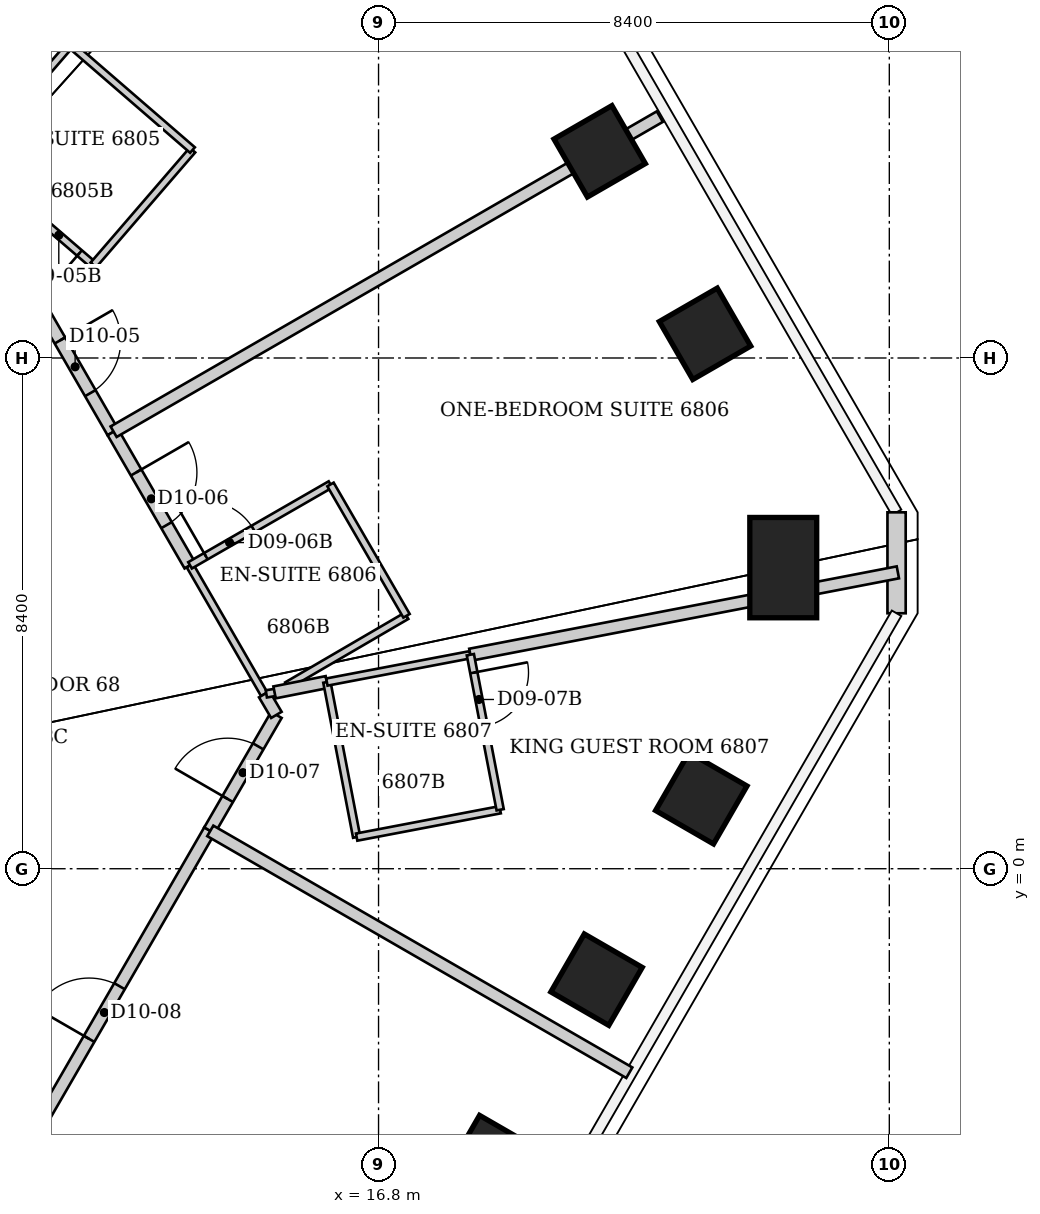
"""IFC4 building model, lengths in metres.
Left out: names, types, materials, properties, quantities, classifications, styles, units other than length and angle.
Written with IfcOpenShell. Run it as: python <this file> out.ifc"""

import sys

from ifc_helpers import new_model, si_unit, direction, frame, frame_2d, origin, origin_2d, place, context, subcontext, project, spatial, rectangle, extrude, element, fill, save


model = new_model("IFC4")
c1 = context("Model", 3, precision=1e-05, world=origin(), true_north=direction((0.0, 1.0)))
c2 = subcontext(c1, "Body", "Model", "MODEL_VIEW")
j1 = project(units=[si_unit("LENGTHUNIT", "METRE"), si_unit("PLANEANGLEUNIT", "RADIAN")], contexts=[c1])
p1 = place(None, origin())
s1 = spatial("IfcSite", under=j1, at=p1, CompositionType="ELEMENT")
p2 = place(p1, origin())
s2 = spatial("IfcBuilding", under=s1, at=p2, CompositionType="ELEMENT")
p3 = place(p2, frame((0.0, 0.0, 272.2)))
s3 = spatial("IfcBuildingStorey", under=s2, at=p3, CompositionType="ELEMENT", Elevation=272.2)
for number, where, z_axis, x_axis in (
    (1, (20.437, 11.799, 0.0), (0.0, 0.0, 1.0), (0.866, 0.5, 0.0)),
    (2, (22.169, 8.798, 0.0), (0.0, 0.0, 1.0), (0.866, 0.5, 0.0)),
):
    element("IfcColumn", number, at=place(p3, frame(where, z_axis=z_axis, x_axis=x_axis)), inside=s3, PredefinedType="COLUMN", context=c2, shape_type="SweptSolid", body=[
        extrude(rectangle(XDim=1.1, YDim=1.1, at=origin_2d()), origin(), (0.0, 0.0, 1.0), 3.8),
    ])
p4 = place(p3, frame((23.456, 4.952, 0.0), z_axis=(0.0, 0.0, 1.0), x_axis=(1.0, 0.0, 0.0)))
e3 = element("IfcColumn", 3, at=p4, inside=s3, PredefinedType="COLUMN", context=c2, shape_type="SweptSolid", body=[
    extrude(rectangle(XDim=1.1, YDim=1.65, at=origin_2d()), origin(), (0.0, 0.0, 1.0), 3.8),
])
for number, where, z_axis, x_axis in (
    (4, (22.108, 1.159, 0.0), (0.0, 0.0, 1.0), (0.866, -0.5, 0.0)),
    (5, (20.385, -1.824, 0.0), (0.0, 0.0, 1.0), (0.866, -0.5, 0.0)),
    (6, (18.663, -4.808, 0.0), (0.0, 0.0, 1.0), (0.866, -0.5, 0.0)),
):
    element("IfcColumn", number, at=place(p3, frame(where, z_axis=z_axis, x_axis=x_axis)), inside=s3, PredefinedType="COLUMN", context=c2, shape_type="SweptSolid", body=[
        extrude(rectangle(XDim=1.1, YDim=1.1, at=origin_2d()), origin(), (0.0, 0.0, 1.0), 3.8),
    ])
p5 = place(p3, frame((25.319, 5.862, 0.0), z_axis=(0.0, 0.0, 1.0), x_axis=(0.0, -1.0, 0.0)))
e7 = element("IfcWall", 7, at=p5, inside=s3, PredefinedType="SOLIDWALL", context=c2, shape_type="SweptSolid", body=[
    extrude(rectangle(XDim=1.66, YDim=0.3, at=frame_2d((0.83, 0.0))), origin(), (0.0, 0.0, 1.0), 3.64),
])
p6 = place(p3, frame((10.096, 11.663, 0.0), z_axis=(0.0, 0.0, 1.0), x_axis=(0.654079520224, 0.7564257936, 0.0)))
e8 = element("IfcWall", 8, at=p6, inside=s3, PredefinedType="PARTITIONING", context=c2, shape_type="SweptSolid", body=[
    extrude(rectangle(XDim=2.502, YDim=0.12, at=frame_2d((1.251, 0.0))), origin(), (0.0, 0.0, 1.0), 3.64),
])
p7 = place(p3, frame((10.1, 11.66, 0.0), z_axis=(0.0, 0.0, 1.0), x_axis=(0.757929364221, -0.652336630009, 0.0)))
e9 = element("IfcWall", 9, at=p7, inside=s3, PredefinedType="PARTITIONING", context=c2, shape_type="SweptSolid", body=[
    extrude(rectangle(XDim=2.652, YDim=0.12, at=frame_2d((1.326, 0.0))), origin(), (0.0, 0.0, 1.0), 3.64),
])
p8 = place(p7, frame((1.452, 0.0, 0.0)))
e10 = element("IfcOpeningElement", 10, at=p8, cuts=e9, PredefinedType="OPENING", context=c2, shape_type="SweptSolid", body=[
    extrude(rectangle(XDim=0.9, YDim=2.03, at=frame_2d((0.45, 1.015))), frame((0.0, 0.06, 0.0), z_axis=(0.0, -1.0, 0.0), x_axis=(1.0, 0.0, 0.0)), (0.0, 0.0, 1.0), 0.12),
])
p9 = place(p3, frame((10.56, -5.36, 0.0), z_axis=(0.0, 0.0, 1.0), x_axis=(0.500162347976, 0.865931651845, 0.0)))
e11 = element("IfcWall", 11, at=p9, inside=s3, PredefinedType="PARTITIONING", context=c2, shape_type="SweptSolid", body=[
    extrude(rectangle(XDim=6.918, YDim=0.2, at=frame_2d((3.459, 0.0))), origin(), (0.0, 0.0, 1.0), 3.64),
])
p10 = place(p9, frame((2.959, 0.0, 0.0)))
e12 = element("IfcOpeningElement", 12, at=p10, cuts=e11, PredefinedType="OPENING", context=c2, shape_type="SweptSolid", body=[
    extrude(rectangle(XDim=1.0, YDim=2.13, at=frame_2d((0.5, 1.065))), frame((0.0, 0.1, 0.0), z_axis=(0.0, -1.0, 0.0), x_axis=(1.0, 0.0, 0.0)), (0.0, 0.0, 1.0), 0.2),
])
p11 = place(p3, frame((11.19, 9.33, 0.0), z_axis=(0.0, 0.0, 1.0), x_axis=(0.499577688184, -0.866269088372, 0.0)))
e13 = element("IfcWall", 13, at=p11, inside=s3, PredefinedType="PARTITIONING", context=c2, shape_type="SweptSolid", body=[
    extrude(rectangle(XDim=2.482, YDim=0.2, at=frame_2d((1.241, 0.0))), origin(), (0.0, 0.0, 1.0), 3.64),
])
p12 = place(p11, frame((0.741, 0.0, 0.0)))
e14 = element("IfcOpeningElement", 14, at=p12, cuts=e13, PredefinedType="OPENING", context=c2, shape_type="SweptSolid", body=[
    extrude(rectangle(XDim=1.0, YDim=2.13, at=frame_2d((0.5, 1.065))), frame((0.0, 0.1, 0.0), z_axis=(0.0, -1.0, 0.0), x_axis=(1.0, 0.0, 0.0)), (0.0, 0.0, 1.0), 0.2),
])
p13 = place(p3, frame((12.11, 9.93, 0.0), z_axis=(0.0, 0.0, 1.0), x_axis=(0.65304410808, 0.757319874889, 0.0)))
e15 = element("IfcWall", 15, at=p13, inside=s3, PredefinedType="PARTITIONING", context=c2, shape_type="SweptSolid", body=[
    extrude(rectangle(XDim=2.496, YDim=0.12, at=frame_2d((1.248, 0.0))), origin(), (0.0, 0.0, 1.0), 3.64),
])
p14 = place(p3, frame((12.43, 7.18, 0.0), z_axis=(0.0, 0.0, 1.0), x_axis=(0.500329012441, -0.865835365015, 0.0)))
e16 = element("IfcWall", 16, at=p14, inside=s3, PredefinedType="PARTITIONING", context=c2, shape_type="SweptSolid", body=[
    extrude(rectangle(XDim=2.531, YDim=0.2, at=frame_2d((1.266, 0.0))), origin(), (0.0, 0.0, 1.0), 3.64),
])
p15 = place(p14, frame((0.766, 0.0, 0.0)))
e17 = element("IfcOpeningElement", 17, at=p15, cuts=e16, PredefinedType="OPENING", context=c2, shape_type="SweptSolid", body=[
    extrude(rectangle(XDim=1.0, YDim=2.13, at=frame_2d((0.5, 1.065))), frame((0.0, 0.1, 0.0), z_axis=(0.0, -1.0, 0.0), x_axis=(1.0, 0.0, 0.0)), (0.0, 0.0, 1.0), 0.2),
])
p16 = place(p3, frame((13.697, 4.988, 0.0), z_axis=(0.0, 0.0, 1.0), x_axis=(0.500142899558, -0.865942884965, 0.0)))
e18 = element("IfcWall", 18, at=p16, inside=s3, PredefinedType="PARTITIONING", context=c2, shape_type="SweptSolid", body=[
    extrude(rectangle(XDim=2.446, YDim=0.12, at=frame_2d((1.223, 0.0))), origin(), (0.0, 0.0, 1.0), 3.64),
])
p17 = place(p3, frame((13.74, 11.82, 0.0), z_axis=(0.0, 0.0, 1.0), x_axis=(-0.756316256301, 0.6542061758, 0.0)))
e19 = element("IfcWall", 19, at=p17, inside=s3, PredefinedType="PARTITIONING", context=c2, shape_type="SweptSolid", body=[
    extrude(rectangle(XDim=2.644, YDim=0.12, at=frame_2d((1.322, 0.0))), origin(), (0.0, 0.0, 1.0), 3.64),
])
p18 = place(p3, frame((14.02, 0.63, 0.0), z_axis=(0.0, 0.0, 1.0), x_axis=(0.500957366999, 0.865471961677, 0.0)))
e20 = element("IfcWall", 20, at=p18, inside=s3, PredefinedType="PARTITIONING", context=c2, shape_type="SweptSolid", body=[
    extrude(rectangle(XDim=2.196, YDim=0.2, at=frame_2d((1.098, 0.0))), origin(), (0.0, 0.0, 1.0), 3.64),
])
p19 = place(p18, frame((0.598, 0.0, 0.0)))
e21 = element("IfcOpeningElement", 21, at=p19, cuts=e20, PredefinedType="OPENING", context=c2, shape_type="SweptSolid", body=[
    extrude(rectangle(XDim=1.0, YDim=2.13, at=frame_2d((0.5, 1.065))), frame((0.0, 0.1, 0.0), z_axis=(0.0, -1.0, 0.0), x_axis=(1.0, 0.0, 0.0)), (0.0, 0.0, 1.0), 0.2),
])
p20 = place(p3, frame((14.92, 2.87, 0.0), z_axis=(0.0, 0.0, 1.0), x_axis=(0.507290461451, -0.861775137562, 0.0)))
e22 = element("IfcWall", 22, at=p20, inside=s3, PredefinedType="PARTITIONING", context=c2, shape_type="SweptSolid", body=[
    extrude(rectangle(XDim=0.395, YDim=0.2, at=frame_2d((0.197, 0.0))), origin(), (0.0, 0.0, 1.0), 3.64),
])
p21 = place(p3, frame((14.955, 2.876, 0.0), z_axis=(0.0, 0.0, 1.0), x_axis=(0.986483246584, 0.16386215002, 0.0)))
e23 = element("IfcWall", 23, at=p21, inside=s3, PredefinedType="PARTITIONING", context=c2, shape_type="SweptSolid", body=[
    extrude(rectangle(XDim=0.147, YDim=0.12, at=frame_2d((0.074, 0.0))), origin(), (0.0, 0.0, 1.0), 3.64),
])
p22 = place(p3, frame((15.294, 3.013, 0.0), z_axis=(0.0, 0.0, 1.0), x_axis=(0.863798357138, 0.503837670491, 0.0)))
e24 = element("IfcWall", 24, at=p22, inside=s3, PredefinedType="PARTITIONING", context=c2, shape_type="SweptSolid", body=[
    extrude(rectangle(XDim=2.275, YDim=0.12, at=frame_2d((1.138, 0.0))), origin(), (0.0, 0.0, 1.0), 3.64),
])
p23 = place(p3, frame((15.95, 3.07, 0.0), z_axis=(0.0, 0.0, 1.0), x_axis=(-0.980975039503, -0.194133901912, 0.0)))
e25 = element("IfcWall", 25, at=p23, inside=s3, PredefinedType="PARTITIONING", context=c2, shape_type="SweptSolid", body=[
    extrude(rectangle(XDim=0.876, YDim=0.2, at=frame_2d((0.438, 0.0))), origin(), (0.0, 0.0, 1.0), 3.64),
])
p24 = place(p3, frame((15.95, 3.07, 0.0), z_axis=(0.0, 0.0, 1.0), x_axis=(0.188697442844, -0.982035271802, 0.0)))
e26 = element("IfcWall", 26, at=p24, inside=s3, PredefinedType="PARTITIONING", context=c2, shape_type="SweptSolid", body=[
    extrude(rectangle(XDim=2.597, YDim=0.12, at=frame_2d((1.298, 0.0))), origin(), (0.0, 0.0, 1.0), 3.64),
])
p25 = place(p3, frame((15.95, 3.07, 0.0), z_axis=(0.0, 0.0, 1.0), x_axis=(0.982307423658, 0.187275533444, 0.0)))
e27 = element("IfcWall", 27, at=p25, inside=s3, PredefinedType="PARTITIONING", context=c2, shape_type="SweptSolid", body=[
    extrude(rectangle(XDim=2.403, YDim=0.12, at=frame_2d((1.201, 0.0))), origin(), (0.0, 0.0, 1.0), 3.64),
])
p26 = place(p3, frame((16.01, 6.32, 0.0), z_axis=(0.0, 0.0, 1.0), x_axis=(-0.866615255992, -0.498976951453, 0.0)))
e28 = element("IfcWall", 28, at=p26, inside=s3, PredefinedType="PARTITIONING", context=c2, shape_type="SweptSolid", body=[
    extrude(rectangle(XDim=2.666, YDim=0.12, at=frame_2d((1.333, 0.0))), origin(), (0.0, 0.0, 1.0), 3.64),
])
p27 = place(p26, frame((1.466, 0.0, 0.0)))
e29 = element("IfcOpeningElement", 29, at=p27, cuts=e28, PredefinedType="OPENING", context=c2, shape_type="SweptSolid", body=[
    extrude(rectangle(XDim=0.9, YDim=2.03, at=frame_2d((0.45, 1.015))), frame((0.0, 0.06, 0.0), z_axis=(0.0, -1.0, 0.0), x_axis=(1.0, 0.0, 0.0)), (0.0, 0.0, 1.0), 0.12),
])
p28 = place(p3, frame((16.44, 0.52, 0.0), z_axis=(0.0, 0.0, 1.0), x_axis=(0.982307423658, 0.187275533444, 0.0)))
e30 = element("IfcWall", 30, at=p28, inside=s3, PredefinedType="PARTITIONING", context=c2, shape_type="SweptSolid", body=[
    extrude(rectangle(XDim=2.403, YDim=0.12, at=frame_2d((1.201, 0.0))), origin(), (0.0, 0.0, 1.0), 3.64),
])
p29 = place(p3, frame((17.26, 4.16, 0.0), z_axis=(0.0, 0.0, 1.0), x_axis=(-0.500851167559, 0.865533423938, 0.0)))
e31 = element("IfcWall", 31, at=p29, inside=s3, PredefinedType="PARTITIONING", context=c2, shape_type="SweptSolid", body=[
    extrude(rectangle(XDim=2.496, YDim=0.12, at=frame_2d((1.248, 0.0))), origin(), (0.0, 0.0, 1.0), 3.64),
])
p30 = place(p3, frame((18.31, 3.52, 0.0), z_axis=(0.0, 0.0, 1.0), x_axis=(0.981948758854, 0.189147125234, 0.0)))
e32 = element("IfcWall", 32, at=p30, inside=s3, PredefinedType="PARTITIONING", context=c2, shape_type="SweptSolid", body=[
    extrude(rectangle(XDim=7.16, YDim=0.2, at=frame_2d((3.58, 0.0))), origin(), (0.0, 0.0, 1.0), 3.64),
])
p31 = place(p3, frame((18.8, 0.97, 0.0), z_axis=(0.0, 0.0, 1.0), x_axis=(-0.188697442844, 0.982035271802, 0.0)))
e33 = element("IfcWall", 33, at=p31, inside=s3, PredefinedType="PARTITIONING", context=c2, shape_type="SweptSolid", body=[
    extrude(rectangle(XDim=2.597, YDim=0.12, at=frame_2d((1.298, 0.0))), origin(), (0.0, 0.0, 1.0), 3.64),
])
p32 = place(p31, frame((1.397, 0.0, 0.0)))
e34 = element("IfcOpeningElement", 34, at=p32, cuts=e33, PredefinedType="OPENING", context=c2, shape_type="SweptSolid", body=[
    extrude(rectangle(XDim=0.9, YDim=2.03, at=frame_2d((0.45, 1.015))), frame((0.0, 0.06, 0.0), z_axis=(0.0, -1.0, 0.0), x_axis=(1.0, 0.0, 0.0)), (0.0, 0.0, 1.0), 0.12),
])
p33 = place(p3, frame((20.924, -3.355, 0.0), z_axis=(0.0, 0.0, 1.0), x_axis=(-0.866082379937, 0.499901301422, 0.0)))
e35 = element("IfcWall", 35, at=p33, inside=s3, PredefinedType="PARTITIONING", context=c2, shape_type="SweptSolid", body=[
    extrude(rectangle(XDim=7.957, YDim=0.2, at=frame_2d((3.978, 0.0))), origin(), (0.0, 0.0, 1.0), 3.64),
])
p34 = place(p3, frame((21.426, 12.37, 0.0), z_axis=(0.0, 0.0, 1.0), x_axis=(-0.866178531411, -0.499734681328, 0.0)))
e36 = element("IfcWall", 36, at=p34, inside=s3, PredefinedType="PARTITIONING", context=c2, shape_type="SweptSolid", body=[
    extrude(rectangle(XDim=10.371, YDim=0.2, at=frame_2d((5.186, 0.0))), origin(), (0.0, 0.0, 1.0), 2.878),
])
p35 = place(p12, origin())
e37 = element("IfcDoor", 37, at=p35, inside=s3, OperationType="SINGLE_SWING_LEFT", PredefinedType="DOOR", context=c2, shape_type="SweptSolid", body=[
    extrude(rectangle(XDim=1.0, YDim=2.13, at=frame_2d((0.5, 1.065))), frame((0.0, 0.025, 0.0), z_axis=(0.0, -1.0, 0.0), x_axis=(1.0, 0.0, 0.0)), (0.0, 0.0, 1.0), 0.05),
])
fill(e14, e37)
p36 = place(p8, origin())
e38 = element("IfcDoor", 38, at=p36, inside=s3, OperationType="SINGLE_SWING_RIGHT", PredefinedType="DOOR", context=c2, shape_type="SweptSolid", body=[
    extrude(rectangle(XDim=0.9, YDim=2.03, at=frame_2d((0.45, 1.015))), frame((0.0, 0.025, 0.0), z_axis=(0.0, -1.0, 0.0), x_axis=(1.0, 0.0, 0.0)), (0.0, 0.0, 1.0), 0.05),
])
fill(e10, e38)
p37 = place(p15, origin())
e39 = element("IfcDoor", 39, at=p37, inside=s3, OperationType="SINGLE_SWING_LEFT", PredefinedType="DOOR", context=c2, shape_type="SweptSolid", body=[
    extrude(rectangle(XDim=1.0, YDim=2.13, at=frame_2d((0.5, 1.065))), frame((0.0, 0.025, 0.0), z_axis=(0.0, -1.0, 0.0), x_axis=(1.0, 0.0, 0.0)), (0.0, 0.0, 1.0), 0.05),
])
fill(e17, e39)
p38 = place(p27, origin())
e40 = element("IfcDoor", 40, at=p38, inside=s3, OperationType="SINGLE_SWING_RIGHT", PredefinedType="DOOR", context=c2, shape_type="SweptSolid", body=[
    extrude(rectangle(XDim=0.9, YDim=2.03, at=frame_2d((0.45, 1.015))), frame((0.0, 0.025, 0.0), z_axis=(0.0, -1.0, 0.0), x_axis=(1.0, 0.0, 0.0)), (0.0, 0.0, 1.0), 0.05),
])
fill(e29, e40)
p39 = place(p19, origin())
e41 = element("IfcDoor", 41, at=p39, inside=s3, OperationType="SINGLE_SWING_LEFT", PredefinedType="DOOR", context=c2, shape_type="SweptSolid", body=[
    extrude(rectangle(XDim=1.0, YDim=2.13, at=frame_2d((0.5, 1.065))), frame((0.0, 0.025, 0.0), z_axis=(0.0, -1.0, 0.0), x_axis=(1.0, 0.0, 0.0)), (0.0, 0.0, 1.0), 0.05),
])
fill(e21, e41)
p40 = place(p32, origin())
e42 = element("IfcDoor", 42, at=p40, inside=s3, OperationType="SINGLE_SWING_RIGHT", PredefinedType="DOOR", context=c2, shape_type="SweptSolid", body=[
    extrude(rectangle(XDim=0.9, YDim=2.03, at=frame_2d((0.45, 1.015))), frame((0.0, 0.025, 0.0), z_axis=(0.0, -1.0, 0.0), x_axis=(1.0, 0.0, 0.0)), (0.0, 0.0, 1.0), 0.05),
])
fill(e34, e42)
p41 = place(p10, origin())
e43 = element("IfcDoor", 43, at=p41, inside=s3, OperationType="SINGLE_SWING_LEFT", PredefinedType="DOOR", context=c2, shape_type="SweptSolid", body=[
    extrude(rectangle(XDim=1.0, YDim=2.13, at=frame_2d((0.5, 1.065))), frame((0.0, 0.025, 0.0), z_axis=(0.0, -1.0, 0.0), x_axis=(1.0, 0.0, 0.0)), (0.0, 0.0, 1.0), 0.05),
])
fill(e12, e43)
save(model, sys.argv[1])
